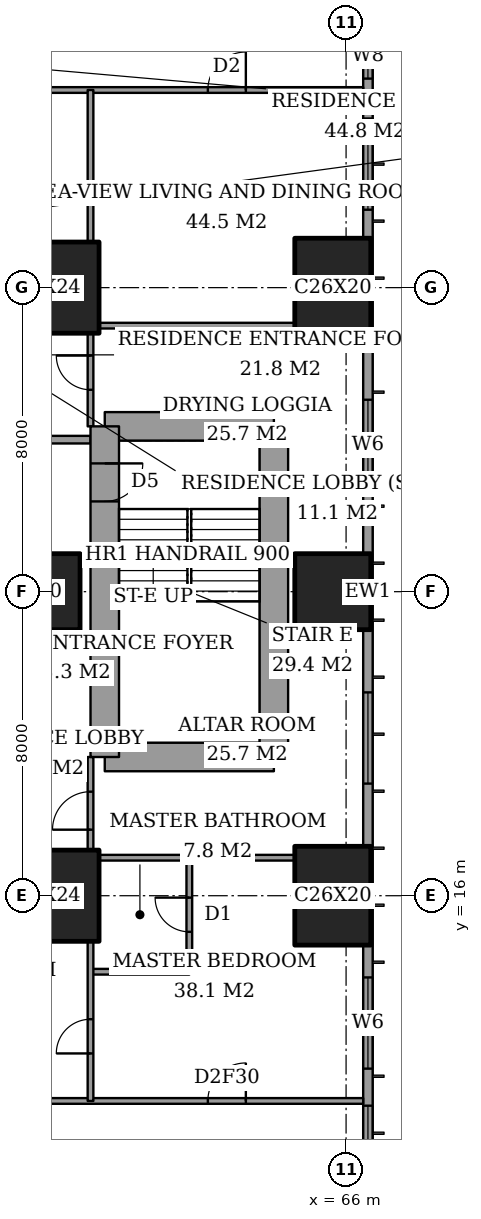
"""IFC4 building model, lengths in metres.
Left out: names, types, materials, properties, quantities, classifications, styles, units other than length and angle.
Written with IfcOpenShell. Run it as: python <this file> out.ifc"""

import sys

from ifc_helpers import new_model, si_unit, direction, frame, frame_2d, origin, origin_2d, place, context, subcontext, project, spatial, rectangle, extrude, element, fill, save


model = new_model("IFC4")
c1 = context("Model", 3, precision=1e-05, world=origin(), true_north=direction((0.0, 1.0)))
c2 = subcontext(c1, "Body", "Model", "MODEL_VIEW")
j1 = project(units=[si_unit("LENGTHUNIT", "METRE"), si_unit("PLANEANGLEUNIT", "RADIAN")], contexts=[c1])
p1 = place(None, origin())
s1 = spatial("IfcSite", under=j1, at=p1, CompositionType="ELEMENT")
p2 = place(p1, origin())
s2 = spatial("IfcBuilding", under=s1, at=p2, CompositionType="ELEMENT")
p3 = place(p2, frame((0.0, 0.0, 62.0)))
s3 = spatial("IfcBuildingStorey", under=s2, at=p3, CompositionType="ELEMENT", Elevation=62.0)
p4 = place(p3, frame((58.0, 16.0, 0.0), z_axis=(0.0, 0.0, 1.0), x_axis=(1.0, 0.0, 0.0)))
e1 = element("IfcColumn", 1, at=p4, inside=s3, PredefinedType="COLUMN", context=c2, shape_type="SweptSolid", body=[
    extrude(rectangle(XDim=3.0, YDim=2.4, at=origin_2d()), origin(), (0.0, 0.0, 1.0), 3.6),
])
p5 = place(p3, frame((58.0, 24.0, 0.0), z_axis=(0.0, 0.0, 1.0), x_axis=(1.0, 0.0, 0.0)))
e2 = element("IfcColumn", 2, at=p5, inside=s3, PredefinedType="COLUMN", context=c2, shape_type="SweptSolid", body=[
    extrude(rectangle(XDim=2.0, YDim=2.0, at=origin_2d()), origin(), (0.0, 0.0, 1.0), 3.6),
])
p6 = place(p3, frame((58.0, 32.0, 0.0), z_axis=(0.0, 0.0, 1.0), x_axis=(1.0, 0.0, 0.0)))
e3 = element("IfcColumn", 3, at=p6, inside=s3, PredefinedType="COLUMN", context=c2, shape_type="SweptSolid", body=[
    extrude(rectangle(XDim=3.0, YDim=2.4, at=origin_2d()), origin(), (0.0, 0.0, 1.0), 3.6),
])
p7 = place(p3, frame((65.65, 16.0, 0.0), z_axis=(0.0, 0.0, 1.0), x_axis=(0.0, 1.0, 0.0)))
e4 = element("IfcColumn", 4, at=p7, inside=s3, PredefinedType="COLUMN", context=c2, shape_type="SweptSolid", body=[
    extrude(rectangle(XDim=2.6, YDim=2.0, at=origin_2d()), origin(), (0.0, 0.0, 1.0), 3.6),
])
p8 = place(p3, frame((65.65, 24.0, 0.0), z_axis=(0.0, 0.0, 1.0), x_axis=(1.0, 0.0, 0.0)))
e5 = element("IfcColumn", 5, at=p8, inside=s3, PredefinedType="COLUMN", context=c2, shape_type="SweptSolid", body=[
    extrude(rectangle(XDim=2.0, YDim=2.0, at=origin_2d()), origin(), (0.0, 0.0, 1.0), 3.6),
])
p9 = place(p3, frame((65.65, 32.0, 0.0), z_axis=(0.0, 0.0, 1.0), x_axis=(0.0, 1.0, 0.0)))
e6 = element("IfcColumn", 6, at=p9, inside=s3, PredefinedType="COLUMN", context=c2, shape_type="SweptSolid", body=[
    extrude(rectangle(XDim=2.6, YDim=2.0, at=origin_2d()), origin(), (0.0, 0.0, 1.0), 3.6),
])
p10 = place(p3, frame((59.65, 19.65, 0.0), z_axis=(0.0, 0.0, 1.0), x_axis=(1.0, 0.0, 0.0)))
e7 = element("IfcWall", 7, at=p10, inside=s3, PredefinedType="SHEAR", context=c2, shape_type="SweptSolid", body=[
    extrude(rectangle(XDim=4.45, YDim=0.75, at=frame_2d((2.225, 0.0))), origin(), (0.0, 0.0, 1.0), 3.6),
])
p11 = place(p3, frame((64.1, 19.65, 0.0), z_axis=(0.0, 0.0, 1.0), x_axis=(0.0, 1.0, 0.0)))
e8 = element("IfcWall", 8, at=p11, inside=s3, PredefinedType="SHEAR", context=c2, shape_type="SweptSolid", body=[
    extrude(rectangle(XDim=8.7, YDim=0.75, at=frame_2d((4.35, 0.0))), origin(), (0.0, 0.0, 1.0), 3.6),
])
p12 = place(p3, frame((64.1, 28.35, 0.0), z_axis=(0.0, 0.0, 1.0), x_axis=(-1.0, 0.0, 0.0)))
e9 = element("IfcWall", 9, at=p12, inside=s3, PredefinedType="SHEAR", context=c2, shape_type="SweptSolid", body=[
    extrude(rectangle(XDim=4.45, YDim=0.75, at=frame_2d((2.225, 0.0))), origin(), (0.0, 0.0, 1.0), 3.6),
])
p13 = place(p3, frame((59.65, 28.35, 0.0), z_axis=(0.0, 0.0, 1.0), x_axis=(0.0, -1.0, 0.0)))
e10 = element("IfcWall", 10, at=p13, inside=s3, PredefinedType="SHEAR", context=c2, shape_type="SweptSolid", body=[
    extrude(rectangle(XDim=8.7, YDim=0.75, at=frame_2d((4.35, 0.0))), origin(), (0.0, 0.0, 1.0), 3.6),
])
p14 = place(p13, frame((0.975, 0.0, 0.0)))
e11 = element("IfcOpeningElement", 11, at=p14, cuts=e10, PredefinedType="OPENING", context=c2, shape_type="SweptSolid", body=[
    extrude(rectangle(XDim=1.0, YDim=2.1, at=frame_2d((0.5, 1.05))), frame((0.0, 0.385, 0.0), z_axis=(0.0, -1.0, 0.0), x_axis=(1.0, 0.0, 0.0)), (0.0, 0.0, 1.0), 0.77),
])
p15 = place(p3, frame((66.575, 3.175, 0.0), z_axis=(0.0, 0.0, 1.0), x_axis=(0.0, 1.0, 0.0)))
e12 = element("IfcWall", 12, at=p15, inside=s3, PredefinedType="SOLIDWALL", context=c2, shape_type="SweptSolid", body=[
    extrude(rectangle(XDim=41.65, YDim=0.25, at=frame_2d((20.825, 0.0))), origin(), (0.0, 0.0, 1.0), 3.6),
])
p16 = place(p15, frame((0.775, 0.0, 0.6)))
e13 = element("IfcOpeningElement", 13, at=p16, cuts=e12, PredefinedType="OPENING", context=c2, shape_type="SweptSolid", body=[
    extrude(rectangle(XDim=2.4, YDim=2.0, at=frame_2d((1.2, 1.0))), frame((0.0, 0.135, 0.0), z_axis=(0.0, -1.0, 0.0), x_axis=(1.0, 0.0, 0.0)), (0.0, 0.0, 1.0), 0.27),
])
p17 = place(p15, frame((6.1, 0.0, 0.6)))
e14 = element("IfcOpeningElement", 14, at=p17, cuts=e12, PredefinedType="OPENING", context=c2, shape_type="SweptSolid", body=[
    extrude(rectangle(XDim=1.2, YDim=2.0, at=frame_2d((0.6, 1.0))), frame((0.0, 0.135, 0.0), z_axis=(0.0, -1.0, 0.0), x_axis=(1.0, 0.0, 0.0)), (0.0, 0.0, 1.0), 0.27),
])
p18 = place(p15, frame((8.275, 0.0, 0.6)))
e15 = element("IfcOpeningElement", 15, at=p18, cuts=e12, PredefinedType="OPENING", context=c2, shape_type="SweptSolid", body=[
    extrude(rectangle(XDim=2.4, YDim=2.0, at=frame_2d((1.2, 1.0))), frame((0.0, 0.135, 0.0), z_axis=(0.0, -1.0, 0.0), x_axis=(1.0, 0.0, 0.0)), (0.0, 0.0, 1.0), 0.27),
])
p19 = place(p15, frame((15.775, 0.0, 0.6)))
e16 = element("IfcOpeningElement", 16, at=p19, cuts=e12, PredefinedType="OPENING", context=c2, shape_type="SweptSolid", body=[
    extrude(rectangle(XDim=2.4, YDim=2.0, at=frame_2d((1.2, 1.0))), frame((0.0, 0.135, 0.0), z_axis=(0.0, -1.0, 0.0), x_axis=(1.0, 0.0, 0.0)), (0.0, 0.0, 1.0), 0.27),
])
p20 = place(p15, frame((23.475, 0.0, 0.6)))
e17 = element("IfcOpeningElement", 17, at=p20, cuts=e12, PredefinedType="OPENING", context=c2, shape_type="SweptSolid", body=[
    extrude(rectangle(XDim=2.4, YDim=2.0, at=frame_2d((1.2, 1.0))), frame((0.0, 0.135, 0.0), z_axis=(0.0, -1.0, 0.0), x_axis=(1.0, 0.0, 0.0)), (0.0, 0.0, 1.0), 0.27),
])
p21 = place(p15, frame((30.875, 0.0, 0.6)))
e18 = element("IfcOpeningElement", 18, at=p21, cuts=e12, PredefinedType="OPENING", context=c2, shape_type="SweptSolid", body=[
    extrude(rectangle(XDim=2.4, YDim=2.0, at=frame_2d((1.2, 1.0))), frame((0.0, 0.135, 0.0), z_axis=(0.0, -1.0, 0.0), x_axis=(1.0, 0.0, 0.0)), (0.0, 0.0, 1.0), 0.27),
])
p22 = place(p15, frame((34.325, 0.0, 0.6)))
e19 = element("IfcOpeningElement", 19, at=p22, cuts=e12, PredefinedType="OPENING", context=c2, shape_type="SweptSolid", body=[
    extrude(rectangle(XDim=1.2, YDim=2.0, at=frame_2d((0.6, 1.0))), frame((0.0, 0.135, 0.0), z_axis=(0.0, -1.0, 0.0), x_axis=(1.0, 0.0, 0.0)), (0.0, 0.0, 1.0), 0.27),
])
p23 = place(p15, frame((38.475, 0.0, 0.6)))
e20 = element("IfcOpeningElement", 20, at=p23, cuts=e12, PredefinedType="OPENING", context=c2, shape_type="SweptSolid", body=[
    extrude(rectangle(XDim=2.4, YDim=2.0, at=frame_2d((1.2, 1.0))), frame((0.0, 0.135, 0.0), z_axis=(0.0, -1.0, 0.0), x_axis=(1.0, 0.0, 0.0)), (0.0, 0.0, 1.0), 0.27),
])
p24 = place(p3, frame((41.439, 10.6, 0.0), z_axis=(0.0, 0.0, 1.0), x_axis=(1.0, 0.0, 0.0)))
e21 = element("IfcWall", 21, at=p24, inside=s3, PredefinedType="PARTITIONING", context=c2, shape_type="SweptSolid", body=[
    extrude(rectangle(XDim=25.011, YDim=0.15, at=frame_2d((12.505, 0.0))), origin(), (0.0, 0.0, 1.0), 3.35),
])
p25 = place(p24, frame((11.961, 0.0, 0.0)))
e22 = element("IfcOpeningElement", 22, at=p25, cuts=e21, PredefinedType="OPENING", context=c2, shape_type="SweptSolid", body=[
    extrude(rectangle(XDim=1.0, YDim=2.1, at=frame_2d((0.5, 1.05))), frame((0.0, 0.085, 0.0), z_axis=(0.0, -1.0, 0.0), x_axis=(1.0, 0.0, 0.0)), (0.0, 0.0, 1.0), 0.17),
])
p26 = place(p24, frame((20.924, 0.0, 0.0)))
e23 = element("IfcOpeningElement", 23, at=p26, cuts=e21, PredefinedType="OPENING", context=c2, shape_type="SweptSolid", body=[
    extrude(rectangle(XDim=1.0, YDim=2.1, at=frame_2d((0.5, 1.05))), frame((0.0, 0.085, 0.0), z_axis=(0.0, -1.0, 0.0), x_axis=(1.0, 0.0, 0.0)), (0.0, 0.0, 1.0), 0.17),
])
p27 = place(p24, frame((9.561, 0.0, 0.0)))
e24 = element("IfcOpeningElement", 24, at=p27, cuts=e21, PredefinedType="OPENING", context=c2, shape_type="SweptSolid", body=[
    extrude(rectangle(XDim=1.0, YDim=2.1, at=frame_2d((0.5, 1.05))), frame((0.0, 0.085, 0.0), z_axis=(0.0, -1.0, 0.0), x_axis=(1.0, 0.0, 0.0)), (0.0, 0.0, 1.0), 0.17),
])
p28 = place(p24, frame((7.161, 0.0, 0.0)))
e25 = element("IfcOpeningElement", 25, at=p28, cuts=e21, PredefinedType="OPENING", context=c2, shape_type="SweptSolid", body=[
    extrude(rectangle(XDim=1.0, YDim=2.1, at=frame_2d((0.5, 1.05))), frame((0.0, 0.085, 0.0), z_axis=(0.0, -1.0, 0.0), x_axis=(1.0, 0.0, 0.0)), (0.0, 0.0, 1.0), 0.17),
])
p29 = place(p24, frame((2.836, 0.0, 0.0)))
e26 = element("IfcOpeningElement", 26, at=p29, cuts=e21, PredefinedType="OPENING", context=c2, shape_type="SweptSolid", body=[
    extrude(rectangle(XDim=1.0, YDim=2.1, at=frame_2d((0.5, 1.05))), frame((0.0, 0.085, 0.0), z_axis=(0.0, -1.0, 0.0), x_axis=(1.0, 0.0, 0.0)), (0.0, 0.0, 1.0), 0.17),
])
p30 = place(p3, frame((59.275, 14.0, 0.0), z_axis=(0.0, 0.0, 1.0), x_axis=(1.0, 0.0, 0.0)))
e27 = element("IfcWall", 27, at=p30, inside=s3, PredefinedType="PARTITIONING", context=c2, shape_type="SweptSolid", body=[
    extrude(rectangle(XDim=2.6, YDim=0.15, at=frame_2d((1.3, 0.0))), origin(), (0.0, 0.0, 1.0), 3.35),
])
p31 = place(p3, frame((59.5, 17.0, 0.0), z_axis=(0.0, 0.0, 1.0), x_axis=(1.0, 0.0, 0.0)))
e28 = element("IfcWall", 28, at=p31, inside=s3, PredefinedType="PARTITIONING", context=c2, shape_type="SweptSolid", body=[
    extrude(rectangle(XDim=5.15, YDim=0.15, at=frame_2d((2.575, 0.0))), origin(), (0.0, 0.0, 1.0), 3.35),
])
p32 = place(p3, frame((42.0, 28.0, 0.0), z_axis=(0.0, 0.0, 1.0), x_axis=(1.0, 0.0, 0.0)))
e29 = element("IfcWall", 29, at=p32, inside=s3, PredefinedType="PARTITIONING", context=c2, shape_type="SweptSolid", body=[
    extrude(rectangle(XDim=17.275, YDim=0.2, at=frame_2d((8.637, 0.0))), origin(), (0.0, 0.0, 1.0), 3.35),
])
p33 = place(p32, frame((9.1, 0.0, 0.0)))
e30 = element("IfcOpeningElement", 30, at=p33, cuts=e29, PredefinedType="OPENING", context=c2, shape_type="SweptSolid", body=[
    extrude(rectangle(XDim=1.2, YDim=2.4, at=frame_2d((0.6, 1.2))), frame((0.0, 0.11, 0.0), z_axis=(0.0, -1.0, 0.0), x_axis=(1.0, 0.0, 0.0)), (0.0, 0.0, 1.0), 0.22),
])
p34 = place(p3, frame((59.5, 31.0, 0.0), z_axis=(0.0, 0.0, 1.0), x_axis=(1.0, 0.0, 0.0)))
e31 = element("IfcWall", 31, at=p34, inside=s3, PredefinedType="PARTITIONING", context=c2, shape_type="SweptSolid", body=[
    extrude(rectangle(XDim=5.15, YDim=0.15, at=frame_2d((2.575, 0.0))), origin(), (0.0, 0.0, 1.0), 3.35),
])
p35 = place(p3, frame((41.439, 37.2, 0.0), z_axis=(0.0, 0.0, 1.0), x_axis=(1.0, 0.0, 0.0)))
e32 = element("IfcWall", 32, at=p35, inside=s3, PredefinedType="PARTITIONING", context=c2, shape_type="SweptSolid", body=[
    extrude(rectangle(XDim=25.011, YDim=0.15, at=frame_2d((12.505, 0.0))), origin(), (0.0, 0.0, 1.0), 3.35),
])
p36 = place(p35, frame((12.361, 0.0, 0.0)))
e33 = element("IfcOpeningElement", 33, at=p36, cuts=e32, PredefinedType="OPENING", context=c2, shape_type="SweptSolid", body=[
    extrude(rectangle(XDim=1.0, YDim=2.1, at=frame_2d((0.5, 1.05))), frame((0.0, 0.085, 0.0), z_axis=(0.0, -1.0, 0.0), x_axis=(1.0, 0.0, 0.0)), (0.0, 0.0, 1.0), 0.17),
])
p37 = place(p35, frame((20.924, 0.0, 0.0)))
e34 = element("IfcOpeningElement", 34, at=p37, cuts=e32, PredefinedType="OPENING", context=c2, shape_type="SweptSolid", body=[
    extrude(rectangle(XDim=1.0, YDim=2.1, at=frame_2d((0.5, 1.05))), frame((0.0, 0.085, 0.0), z_axis=(0.0, -1.0, 0.0), x_axis=(1.0, 0.0, 0.0)), (0.0, 0.0, 1.0), 0.17),
])
p38 = place(p35, frame((15.448, 0.0, 0.0)))
e35 = element("IfcOpeningElement", 35, at=p38, cuts=e32, PredefinedType="OPENING", context=c2, shape_type="SweptSolid", body=[
    extrude(rectangle(XDim=0.9, YDim=2.1, at=frame_2d((0.45, 1.05))), frame((0.0, 0.085, 0.0), z_axis=(0.0, -1.0, 0.0), x_axis=(1.0, 0.0, 0.0)), (0.0, 0.0, 1.0), 0.17),
])
p39 = place(p35, frame((9.961, 0.0, 0.0)))
e36 = element("IfcOpeningElement", 36, at=p39, cuts=e32, PredefinedType="OPENING", context=c2, shape_type="SweptSolid", body=[
    extrude(rectangle(XDim=1.0, YDim=2.1, at=frame_2d((0.5, 1.05))), frame((0.0, 0.085, 0.0), z_axis=(0.0, -1.0, 0.0), x_axis=(1.0, 0.0, 0.0)), (0.0, 0.0, 1.0), 0.17),
])
p40 = place(p35, frame((7.361, 0.0, 0.0)))
e37 = element("IfcOpeningElement", 37, at=p40, cuts=e32, PredefinedType="OPENING", context=c2, shape_type="SweptSolid", body=[
    extrude(rectangle(XDim=1.0, YDim=2.1, at=frame_2d((0.5, 1.05))), frame((0.0, 0.085, 0.0), z_axis=(0.0, -1.0, 0.0), x_axis=(1.0, 0.0, 0.0)), (0.0, 0.0, 1.0), 0.17),
])
p41 = place(p35, frame((2.836, 0.0, 0.0)))
e38 = element("IfcOpeningElement", 38, at=p41, cuts=e32, PredefinedType="OPENING", context=c2, shape_type="SweptSolid", body=[
    extrude(rectangle(XDim=1.0, YDim=2.1, at=frame_2d((0.5, 1.05))), frame((0.0, 0.085, 0.0), z_axis=(0.0, -1.0, 0.0), x_axis=(1.0, 0.0, 0.0)), (0.0, 0.0, 1.0), 0.17),
])
p42 = place(p3, frame((59.275, 10.6, 0.0), z_axis=(0.0, 0.0, 1.0), x_axis=(0.0, 1.0, 0.0)))
e39 = element("IfcWall", 39, at=p42, inside=s3, PredefinedType="PARTITIONING", context=c2, shape_type="SweptSolid", body=[
    extrude(rectangle(XDim=4.2, YDim=0.15, at=frame_2d((2.1, 0.0))), origin(), (0.0, 0.0, 1.0), 3.35),
])
p43 = place(p42, frame((1.25, 0.0, 0.0)))
e40 = element("IfcOpeningElement", 40, at=p43, cuts=e39, PredefinedType="OPENING", context=c2, shape_type="SweptSolid", body=[
    extrude(rectangle(XDim=0.9, YDim=2.1, at=frame_2d((0.45, 1.05))), frame((0.0, 0.085, 0.0), z_axis=(0.0, -1.0, 0.0), x_axis=(1.0, 0.0, 0.0)), (0.0, 0.0, 1.0), 0.17),
])
p44 = place(p3, frame((59.275, 17.2, 0.0), z_axis=(0.0, 0.0, 1.0), x_axis=(0.0, 1.0, 0.0)))
e41 = element("IfcWall", 41, at=p44, inside=s3, PredefinedType="PARTITIONING", context=c2, shape_type="SweptSolid", body=[
    extrude(rectangle(XDim=2.45, YDim=0.15, at=frame_2d((1.225, 0.0))), origin(), (0.0, 0.0, 1.0), 3.35),
])
p45 = place(p44, frame((0.538, 0.0, 0.0)))
e42 = element("IfcOpeningElement", 42, at=p45, cuts=e41, PredefinedType="OPENING", context=c2, shape_type="SweptSolid", body=[
    extrude(rectangle(XDim=1.0, YDim=2.1, at=frame_2d((0.5, 1.05))), frame((0.0, 0.085, 0.0), z_axis=(0.0, -1.0, 0.0), x_axis=(1.0, 0.0, 0.0)), (0.0, 0.0, 1.0), 0.17),
])
p46 = place(p3, frame((59.275, 28.35, 0.0), z_axis=(0.0, 0.0, 1.0), x_axis=(0.0, 1.0, 0.0)))
e43 = element("IfcWall", 43, at=p46, inside=s3, PredefinedType="PARTITIONING", context=c2, shape_type="SweptSolid", body=[
    extrude(rectangle(XDim=2.45, YDim=0.15, at=frame_2d((1.225, 0.0))), origin(), (0.0, 0.0, 1.0), 3.35),
])
p47 = place(p46, frame((0.962, 0.0, 0.0)))
e44 = element("IfcOpeningElement", 44, at=p47, cuts=e43, PredefinedType="OPENING", context=c2, shape_type="SweptSolid", body=[
    extrude(rectangle(XDim=0.9, YDim=2.1, at=frame_2d((0.45, 1.05))), frame((0.0, 0.085, 0.0), z_axis=(0.0, -1.0, 0.0), x_axis=(1.0, 0.0, 0.0)), (0.0, 0.0, 1.0), 0.17),
])
p48 = place(p3, frame((59.275, 33.2, 0.0), z_axis=(0.0, 0.0, 1.0), x_axis=(0.0, 1.0, 0.0)))
e45 = element("IfcWall", 45, at=p48, inside=s3, PredefinedType="PARTITIONING", context=c2, shape_type="SweptSolid", body=[
    extrude(rectangle(XDim=4.0, YDim=0.15, at=frame_2d((2.0, 0.0))), origin(), (0.0, 0.0, 1.0), 3.35),
])
p49 = place(p3, frame((61.875, 14.0, 0.0), z_axis=(0.0, 0.0, 1.0), x_axis=(0.0, 1.0, 0.0)))
e46 = element("IfcWall", 46, at=p49, inside=s3, PredefinedType="PARTITIONING", context=c2, shape_type="SweptSolid", body=[
    extrude(rectangle(XDim=3.0, YDim=0.15, at=frame_2d((1.5, 0.0))), origin(), (0.0, 0.0, 1.0), 3.35),
])
p50 = place(p49, frame((1.05, 0.0, 0.0)))
e47 = element("IfcOpeningElement", 47, at=p50, cuts=e46, PredefinedType="OPENING", context=c2, shape_type="SweptSolid", body=[
    extrude(rectangle(XDim=0.9, YDim=2.1, at=frame_2d((0.45, 1.05))), frame((0.0, 0.085, 0.0), z_axis=(0.0, -1.0, 0.0), x_axis=(1.0, 0.0, 0.0)), (0.0, 0.0, 1.0), 0.17),
])
p51 = place(p17, origin())
e48 = element("IfcWindow", 48, at=p51, inside=s3, PartitioningType="SINGLE_PANEL", PredefinedType="WINDOW", context=c2, shape_type="SweptSolid", body=[
    extrude(rectangle(XDim=1.2, YDim=2.0, at=frame_2d((0.6, 1.0))), frame((0.0, 0.03, 0.0), z_axis=(0.0, -1.0, 0.0), x_axis=(1.0, 0.0, 0.0)), (0.0, 0.0, 1.0), 0.06),
])
fill(e14, e48)
p52 = place(p18, origin())
e49 = element("IfcWindow", 49, at=p52, inside=s3, PartitioningType="SINGLE_PANEL", PredefinedType="WINDOW", context=c2, shape_type="SweptSolid", body=[
    extrude(rectangle(XDim=2.4, YDim=2.0, at=frame_2d((1.2, 1.0))), frame((0.0, 0.03, 0.0), z_axis=(0.0, -1.0, 0.0), x_axis=(1.0, 0.0, 0.0)), (0.0, 0.0, 1.0), 0.06),
])
fill(e15, e49)
p53 = place(p19, origin())
e50 = element("IfcWindow", 50, at=p53, inside=s3, PartitioningType="SINGLE_PANEL", PredefinedType="WINDOW", context=c2, shape_type="SweptSolid", body=[
    extrude(rectangle(XDim=2.4, YDim=2.0, at=frame_2d((1.2, 1.0))), frame((0.0, 0.03, 0.0), z_axis=(0.0, -1.0, 0.0), x_axis=(1.0, 0.0, 0.0)), (0.0, 0.0, 1.0), 0.06),
])
fill(e16, e50)
p54 = place(p20, origin())
e51 = element("IfcWindow", 51, at=p54, inside=s3, PartitioningType="SINGLE_PANEL", PredefinedType="WINDOW", context=c2, shape_type="SweptSolid", body=[
    extrude(rectangle(XDim=2.4, YDim=2.0, at=frame_2d((1.2, 1.0))), frame((0.0, 0.03, 0.0), z_axis=(0.0, -1.0, 0.0), x_axis=(1.0, 0.0, 0.0)), (0.0, 0.0, 1.0), 0.06),
])
fill(e17, e51)
p55 = place(p21, origin())
e52 = element("IfcWindow", 52, at=p55, inside=s3, PartitioningType="SINGLE_PANEL", PredefinedType="WINDOW", context=c2, shape_type="SweptSolid", body=[
    extrude(rectangle(XDim=2.4, YDim=2.0, at=frame_2d((1.2, 1.0))), frame((0.0, 0.03, 0.0), z_axis=(0.0, -1.0, 0.0), x_axis=(1.0, 0.0, 0.0)), (0.0, 0.0, 1.0), 0.06),
])
fill(e18, e52)
p56 = place(p22, origin())
e53 = element("IfcWindow", 53, at=p56, inside=s3, PartitioningType="SINGLE_PANEL", PredefinedType="WINDOW", context=c2, shape_type="SweptSolid", body=[
    extrude(rectangle(XDim=1.2, YDim=2.0, at=frame_2d((0.6, 1.0))), frame((0.0, 0.03, 0.0), z_axis=(0.0, -1.0, 0.0), x_axis=(1.0, 0.0, 0.0)), (0.0, 0.0, 1.0), 0.06),
])
fill(e19, e53)
p57 = place(p50, origin())
e54 = element("IfcDoor", 54, at=p57, inside=s3, OperationType="SINGLE_SWING_LEFT", PredefinedType="DOOR", context=c2, shape_type="SweptSolid", body=[
    extrude(rectangle(XDim=0.9, YDim=2.1, at=frame_2d((0.45, 1.05))), frame((0.0, 0.025, 0.0), z_axis=(0.0, -1.0, 0.0), x_axis=(1.0, 0.0, 0.0)), (0.0, 0.0, 1.0), 0.05),
])
fill(e47, e54)
p58 = place(p26, origin())
e55 = element("IfcDoor", 55, at=p58, inside=s3, OperationType="SINGLE_SWING_LEFT", PredefinedType="DOOR", context=c2, shape_type="SweptSolid", body=[
    extrude(rectangle(XDim=1.0, YDim=2.1, at=frame_2d((0.5, 1.05))), frame((0.0, 0.025, 0.0), z_axis=(0.0, -1.0, 0.0), x_axis=(1.0, 0.0, 0.0)), (0.0, 0.0, 1.0), 0.05),
])
fill(e23, e55)
p59 = place(p45, origin())
e56 = element("IfcDoor", 56, at=p59, inside=s3, OperationType="SINGLE_SWING_RIGHT", PredefinedType="DOOR", context=c2, shape_type="SweptSolid", body=[
    extrude(rectangle(XDim=1.0, YDim=2.1, at=frame_2d((0.5, 1.05))), frame((0.0, 0.025, 0.0), z_axis=(0.0, -1.0, 0.0), x_axis=(1.0, 0.0, 0.0)), (0.0, 0.0, 1.0), 0.05),
])
fill(e42, e56)
p60 = place(p43, origin())
e57 = element("IfcDoor", 57, at=p60, inside=s3, OperationType="SINGLE_SWING_RIGHT", PredefinedType="DOOR", context=c2, shape_type="SweptSolid", body=[
    extrude(rectangle(XDim=0.9, YDim=2.1, at=frame_2d((0.45, 1.05))), frame((0.0, 0.025, 0.0), z_axis=(0.0, -1.0, 0.0), x_axis=(1.0, 0.0, 0.0)), (0.0, 0.0, 1.0), 0.05),
])
fill(e40, e57)
p61 = place(p37, origin())
e58 = element("IfcDoor", 58, at=p61, inside=s3, OperationType="SINGLE_SWING_LEFT", PredefinedType="DOOR", context=c2, shape_type="SweptSolid", body=[
    extrude(rectangle(XDim=1.0, YDim=2.1, at=frame_2d((0.5, 1.05))), frame((0.0, 0.025, 0.0), z_axis=(0.0, -1.0, 0.0), x_axis=(1.0, 0.0, 0.0)), (0.0, 0.0, 1.0), 0.05),
])
fill(e34, e58)
p62 = place(p47, origin())
e59 = element("IfcDoor", 59, at=p62, inside=s3, OperationType="SINGLE_SWING_LEFT", PredefinedType="DOOR", context=c2, shape_type="SweptSolid", body=[
    extrude(rectangle(XDim=0.9, YDim=2.1, at=frame_2d((0.45, 1.05))), frame((0.0, 0.025, 0.0), z_axis=(0.0, -1.0, 0.0), x_axis=(1.0, 0.0, 0.0)), (0.0, 0.0, 1.0), 0.05),
])
fill(e44, e59)
p63 = place(p14, origin())
e60 = element("IfcDoor", 60, at=p63, inside=s3, OperationType="SINGLE_SWING_RIGHT", PredefinedType="DOOR", context=c2, shape_type="SweptSolid", body=[
    extrude(rectangle(XDim=1.0, YDim=2.1, at=frame_2d((0.5, 1.05))), frame((0.0, 0.025, 0.0), z_axis=(0.0, -1.0, 0.0), x_axis=(1.0, 0.0, 0.0)), (0.0, 0.0, 1.0), 0.05),
])
fill(e11, e60)
save(model, sys.argv[1])
